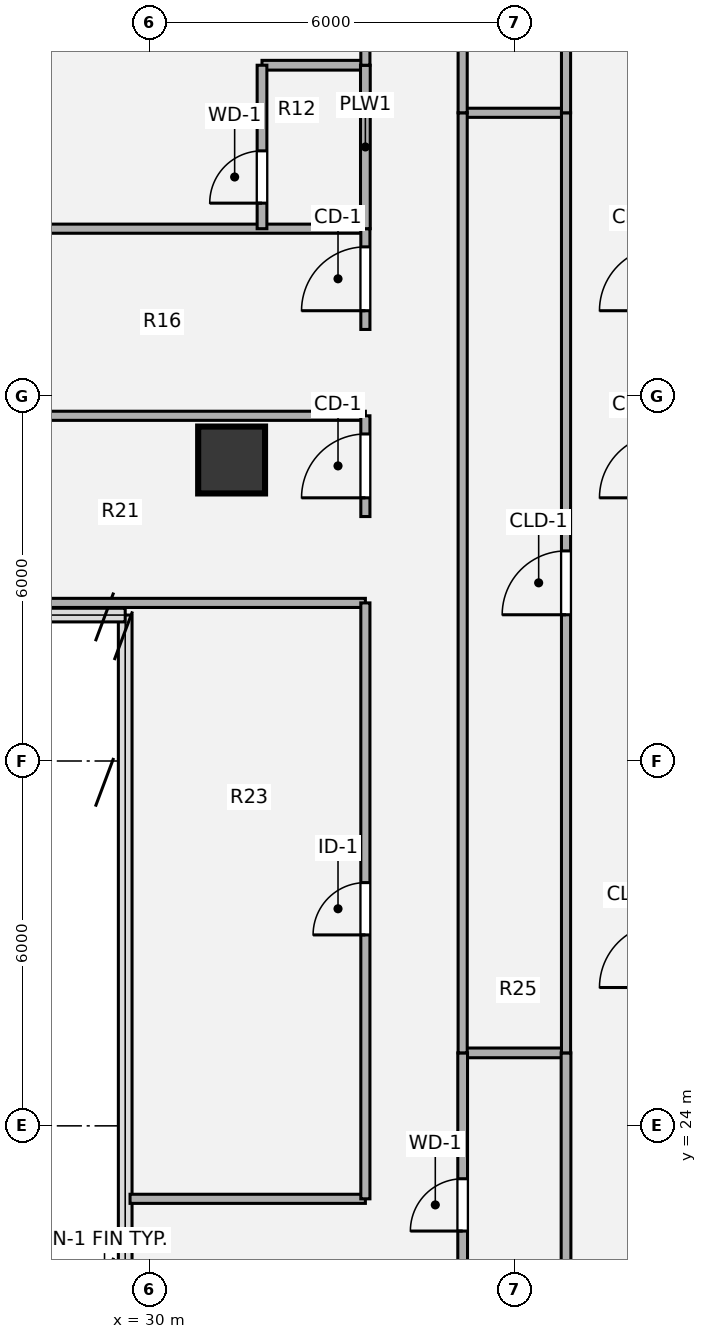
"""IFC4 building model, lengths in metres.
Left out: names, types, materials, properties, quantities, classifications, styles, units other than length and angle.
Written with IfcOpenShell. Run it as: python <this file> out.ifc"""

import sys

from ifc_helpers import new_model, si_unit, direction, frame, frame_2d, origin, origin_2d, place, context, subcontext, project, spatial, rectangle, hollow_circle, extrude, source, transform, mapped, element, fill, save


model = new_model("IFC4")
c1 = context("Model", 3, precision=1e-05, world=origin(), true_north=direction((0.0, 1.0)))
c2 = subcontext(c1, "Body", "Model", "MODEL_VIEW")
j1 = project(units=[si_unit("LENGTHUNIT", "METRE"), si_unit("PLANEANGLEUNIT", "RADIAN")], contexts=[c1])
p1 = place(None, origin())
s1 = spatial("IfcSite", under=j1, at=p1, CompositionType="ELEMENT")
p2 = place(p1, origin())
s2 = spatial("IfcBuilding", under=s1, at=p2, CompositionType="ELEMENT")
p3 = place(p2, frame((0.0, 0.0, 167.76)))
s3 = spatial("IfcBuildingStorey", under=s2, at=p3, CompositionType="ELEMENT", Elevation=167.76)
m1 = source(origin(), c2, "Body", "SweptSolid", [
    extrude(hollow_circle(Radius=0.55, WallThickness=0.04, at=origin_2d()), origin(), (0.0, 0.0, 1.0), 3.78),
])
p4 = place(p3, frame((31.35, 34.95, 0.0), z_axis=(0.0, 0.0, 1.0), x_axis=(1.0, 0.0, 0.0)))
e1 = element("IfcColumn", 1, at=p4, inside=s3, PredefinedType="COLUMN", context=c2, shape_type="MappedRepresentation", body=[
    mapped(m1, transform((0.0, 0.0, 0.0), x_axis=(1.0, 0.0, 0.0), y_axis=(0.0, 1.0, 0.0), z_axis=(0.0, 0.0, 1.0), scale=1.0)),
])
p5 = place(p3, frame((29.68, 22.8, 0.0), z_axis=(0.0, 0.0, 1.0), x_axis=(1.0, 0.0, 0.0)))
e2 = element("IfcWall", 2, at=p5, inside=s3, PredefinedType="PARTITIONING", context=c2, shape_type="SweptSolid", body=[
    extrude(rectangle(XDim=3.87, YDim=0.15, at=frame_2d((1.935, 0.0))), origin(), (0.0, 0.0, 1.0), 3.5),
])
p6 = place(p3, frame((35.15, 25.2, 0.0), z_axis=(0.0, 0.0, 1.0), x_axis=(1.0, 0.0, 0.0)))
e3 = element("IfcWall", 3, at=p6, inside=s3, PredefinedType="PLUMBINGWALL", context=c2, shape_type="SweptSolid", body=[
    extrude(rectangle(XDim=1.7, YDim=0.16, at=frame_2d((0.85, 0.0))), origin(), (0.0, 0.0, 1.0), 3.5),
])
p7 = place(p3, frame((27.557, 32.6, 0.0), z_axis=(0.0, 0.0, 1.0), x_axis=(1.0, 0.0, 0.0)))
e4 = element("IfcWall", 4, at=p7, inside=s3, PredefinedType="PARTITIONING", context=c2, shape_type="SweptSolid", body=[
    extrude(rectangle(XDim=5.993, YDim=0.15, at=frame_2d((2.997, 0.0))), origin(), (0.0, 0.0, 1.0), 3.5),
])
for number, where, z_axis, x_axis in (
    (5, (27.35, 35.677, 0.0), (0.0, 0.0, 1.0), (1.0, 0.0, 0.0)),
    (6, (27.35, 38.754, 0.0), (0.0, 0.0, 1.0), (1.0, 0.0, 0.0)),
):
    element("IfcWall", number, at=place(p3, frame(where, z_axis=z_axis, x_axis=x_axis)), inside=s3, PredefinedType="PARTITIONING", context=c2, shape_type="SweptSolid", body=[
        extrude(rectangle(XDim=6.2, YDim=0.15, at=frame_2d((3.1, 0.0))), origin(), (0.0, 0.0, 1.0), 2.982),
    ])
p8 = place(p3, frame((35.15, 40.66, 0.0), z_axis=(0.0, 0.0, 1.0), x_axis=(1.0, 0.0, 0.0)))
e7 = element("IfcWall", 7, at=p8, inside=s3, PredefinedType="PARTITIONING", context=c2, shape_type="SweptSolid", body=[
    extrude(rectangle(XDim=1.7, YDim=0.15, at=frame_2d((0.85, 0.0))), origin(), (0.0, 0.0, 1.0), 3.259),
])
p9 = place(p3, frame((31.85, 41.442, 0.0), z_axis=(0.0, 0.0, 1.0), x_axis=(1.0, 0.0, 0.0)))
e8 = element("IfcWall", 8, at=p9, inside=s3, PredefinedType="PLUMBINGWALL", context=c2, shape_type="SweptSolid", body=[
    extrude(rectangle(XDim=1.7, YDim=0.16, at=frame_2d((0.85, 0.0))), origin(), (0.0, 0.0, 1.0), 3.259),
])
p10 = place(p3, frame((31.85, 38.754, 0.0), z_axis=(0.0, 0.0, 1.0), x_axis=(0.0, 1.0, 0.0)))
e9 = element("IfcWall", 9, at=p10, inside=s3, PredefinedType="PLUMBINGWALL", context=c2, shape_type="SweptSolid", body=[
    extrude(rectangle(XDim=2.688, YDim=0.16, at=frame_2d((1.344, 0.0))), origin(), (0.0, 0.0, 1.0), 3.5),
])
p11 = place(p10, frame((0.42, 0.0, 0.0)))
e10 = element("IfcOpeningElement", 10, at=p11, cuts=e9, PredefinedType="OPENING", context=c2, shape_type="SweptSolid", body=[
    extrude(rectangle(XDim=0.86, YDim=2.1, at=origin_2d()), frame((0.43, 0.09, 1.05), z_axis=(0.0, -1.0, 0.0), x_axis=(1.0, 0.0, 0.0)), (0.0, 0.0, 1.0), 0.18),
])
p12 = place(p3, frame((33.55, 22.8, 0.0), z_axis=(0.0, 0.0, 1.0), x_axis=(0.0, 1.0, 0.0)))
e11 = element("IfcWall", 11, at=p12, inside=s3, PredefinedType="PARTITIONING", context=c2, shape_type="SweptSolid", body=[
    extrude(rectangle(XDim=9.8, YDim=0.15, at=frame_2d((4.9, 0.0))), origin(), (0.0, 0.0, 1.0), 3.5),
])
p13 = place(p12, frame((4.34, 0.0, 0.0)))
e12 = element("IfcOpeningElement", 12, at=p13, cuts=e11, PredefinedType="OPENING", context=c2, shape_type="SweptSolid", body=[
    extrude(rectangle(XDim=0.86, YDim=2.1, at=origin_2d()), frame((0.43, 0.085, 1.05), z_axis=(0.0, -1.0, 0.0), x_axis=(1.0, 0.0, 0.0)), (0.0, 0.0, 1.0), 0.17),
])
p14 = place(p3, frame((33.55, 34.02, 0.0), z_axis=(0.0, 0.0, 1.0), x_axis=(0.0, 1.0, 0.0)))
e13 = element("IfcWall", 13, at=p14, inside=s3, PredefinedType="PARTITIONING", context=c2, shape_type="SweptSolid", body=[
    extrude(rectangle(XDim=1.657, YDim=0.15, at=frame_2d((0.829, 0.0))), origin(), (0.0, 0.0, 1.0), 3.5),
])
p15 = place(p14, frame((0.308, 0.0, 0.0)))
e14 = element("IfcOpeningElement", 14, at=p15, cuts=e13, PredefinedType="OPENING", context=c2, shape_type="SweptSolid", body=[
    extrude(rectangle(XDim=1.05, YDim=2.1, at=origin_2d()), frame((0.525, 0.085, 1.05), z_axis=(0.0, -1.0, 0.0), x_axis=(1.0, 0.0, 0.0)), (0.0, 0.0, 1.0), 0.17),
])
p16 = place(p3, frame((33.55, 37.097, 0.0), z_axis=(0.0, 0.0, 1.0), x_axis=(0.0, 1.0, 0.0)))
e15 = element("IfcWall", 15, at=p16, inside=s3, PredefinedType="PARTITIONING", context=c2, shape_type="SweptSolid", body=[
    extrude(rectangle(XDim=1.657, YDim=0.15, at=frame_2d((0.829, 0.0))), origin(), (0.0, 0.0, 1.0), 3.5),
])
p17 = place(p16, frame((0.308, 0.0, 0.0)))
e16 = element("IfcOpeningElement", 16, at=p17, cuts=e15, PredefinedType="OPENING", context=c2, shape_type="SweptSolid", body=[
    extrude(rectangle(XDim=1.05, YDim=2.1, at=origin_2d()), frame((0.525, 0.085, 1.05), z_axis=(0.0, -1.0, 0.0), x_axis=(1.0, 0.0, 0.0)), (0.0, 0.0, 1.0), 0.17),
])
p18 = place(p3, frame((33.55, 38.754, 0.0), z_axis=(0.0, 0.0, 1.0), x_axis=(0.0, 1.0, 0.0)))
e17 = element("IfcWall", 17, at=p18, inside=s3, PredefinedType="PLUMBINGWALL", context=c2, shape_type="SweptSolid", body=[
    extrude(rectangle(XDim=2.688, YDim=0.16, at=frame_2d((1.344, 0.0))), origin(), (0.0, 0.0, 1.0), 3.5),
])
p19 = place(p3, frame((33.55, 41.442, 0.0), z_axis=(0.0, 0.0, 1.0), x_axis=(0.0, 1.0, 0.0)))
e18 = element("IfcWall", 18, at=p19, inside=s3, PredefinedType="PARTITIONING", context=c2, shape_type="SweptSolid", body=[
    extrude(rectangle(XDim=3.285, YDim=0.15, at=frame_2d((1.643, 0.0))), origin(), (0.0, 0.0, 1.0), 3.5),
])
p20 = place(p19, frame((1.122, 0.0, 0.0)))
e19 = element("IfcOpeningElement", 19, at=p20, cuts=e18, PredefinedType="OPENING", context=c2, shape_type="SweptSolid", body=[
    extrude(rectangle(XDim=1.05, YDim=2.1, at=origin_2d()), frame((0.525, 0.085, 1.05), z_axis=(0.0, -1.0, 0.0), x_axis=(1.0, 0.0, 0.0)), (0.0, 0.0, 1.0), 0.17),
])
p21 = place(p3, frame((35.15, 20.2, 0.0), z_axis=(0.0, 0.0, 1.0), x_axis=(0.0, 1.0, 0.0)))
e20 = element("IfcWall", 20, at=p21, inside=s3, PredefinedType="PLUMBINGWALL", context=c2, shape_type="SweptSolid", body=[
    extrude(rectangle(XDim=5.0, YDim=0.16, at=frame_2d((2.5, 0.0))), origin(), (0.0, 0.0, 1.0), 3.5),
])
p22 = place(p21, frame((2.07, 0.0, 0.0)))
e21 = element("IfcOpeningElement", 21, at=p22, cuts=e20, PredefinedType="OPENING", context=c2, shape_type="SweptSolid", body=[
    extrude(rectangle(XDim=0.86, YDim=2.1, at=origin_2d()), frame((0.43, 0.09, 1.05), z_axis=(0.0, -1.0, 0.0), x_axis=(1.0, 0.0, 0.0)), (0.0, 0.0, 1.0), 0.18),
])
p23 = place(p3, frame((35.15, 25.2, 0.0), z_axis=(0.0, 0.0, 1.0), x_axis=(0.0, 1.0, 0.0)))
e22 = element("IfcWall", 22, at=p23, inside=s3, PredefinedType="PARTITIONING", context=c2, shape_type="SweptSolid", body=[
    extrude(rectangle(XDim=15.46, YDim=0.15, at=frame_2d((7.73, 0.0))), origin(), (0.0, 0.0, 1.0), 3.5),
])
p24 = place(p3, frame((35.15, 40.66, 0.0), z_axis=(0.0, 0.0, 1.0), x_axis=(0.0, 1.0, 0.0)))
e23 = element("IfcWall", 23, at=p24, inside=s3, PredefinedType="PARTITIONING", context=c2, shape_type="SweptSolid", body=[
    extrude(rectangle(XDim=10.54, YDim=0.15, at=frame_2d((5.27, 0.0))), origin(), (0.0, 0.0, 1.0), 3.5),
])
p25 = place(p24, frame((4.81, 0.0, 0.0)))
e24 = element("IfcOpeningElement", 24, at=p25, cuts=e23, PredefinedType="OPENING", context=c2, shape_type="SweptSolid", body=[
    extrude(rectangle(XDim=0.86, YDim=2.1, at=origin_2d()), frame((0.43, 0.085, 1.05), z_axis=(0.0, -1.0, 0.0), x_axis=(1.0, 0.0, 0.0)), (0.0, 0.0, 1.0), 0.17),
])
p26 = place(p3, frame((36.85, 20.2, 0.0), z_axis=(0.0, 0.0, 1.0), x_axis=(0.0, 1.0, 0.0)))
e25 = element("IfcWall", 25, at=p26, inside=s3, PredefinedType="PLUMBINGWALL", context=c2, shape_type="SweptSolid", body=[
    extrude(rectangle(XDim=5.0, YDim=0.16, at=frame_2d((2.5, 0.0))), origin(), (0.0, 0.0, 1.0), 3.5),
])
p27 = place(p3, frame((36.85, 25.2, 0.0), z_axis=(0.0, 0.0, 1.0), x_axis=(0.0, 1.0, 0.0)))
e26 = element("IfcWall", 26, at=p27, inside=s3, PredefinedType="PARTITIONING", context=c2, shape_type="SweptSolid", body=[
    extrude(rectangle(XDim=15.46, YDim=0.15, at=frame_2d((7.73, 0.0))), origin(), (0.0, 0.0, 1.0), 3.5),
])
p28 = place(p27, frame((7.205, 0.0, 0.0)))
e27 = element("IfcOpeningElement", 27, at=p28, cuts=e26, PredefinedType="OPENING", context=c2, shape_type="SweptSolid", body=[
    extrude(rectangle(XDim=1.05, YDim=2.1, at=origin_2d()), frame((0.525, 0.085, 1.05), z_axis=(0.0, -1.0, 0.0), x_axis=(1.0, 0.0, 0.0)), (0.0, 0.0, 1.0), 0.17),
])
p29 = place(p3, frame((36.85, 40.66, 0.0), z_axis=(0.0, 0.0, 1.0), x_axis=(0.0, 1.0, 0.0)))
e28 = element("IfcWall", 28, at=p29, inside=s3, PredefinedType="PARTITIONING", context=c2, shape_type="SweptSolid", body=[
    extrude(rectangle(XDim=10.54, YDim=0.15, at=frame_2d((5.27, 0.0))), origin(), (0.0, 0.0, 1.0), 3.5),
])
m2 = source(origin(), c2, "Body", "SweptSolid", [
    extrude(rectangle(XDim=0.86, YDim=2.1, at=origin_2d()), frame((0.43, 0.025, 1.05), z_axis=(0.0, -1.0, 0.0), x_axis=(1.0, 0.0, 0.0)), (0.0, 0.0, 1.0), 0.05),
])
p30 = place(p11, origin())
e29 = element("IfcDoor", 29, at=p30, inside=s3, OperationType="SINGLE_SWING_LEFT", PredefinedType="DOOR", context=c2, shape_type="MappedRepresentation", body=[
    mapped(m2, transform((0.0, 0.0, 0.0), x_axis=(1.0, 0.0, 0.0), y_axis=(0.0, 1.0, 0.0), z_axis=(0.0, 0.0, 1.0), scale=1.0)),
])
fill(e10, e29)
m3 = source(origin(), c2, "Body", "SweptSolid", [
    extrude(rectangle(XDim=0.86, YDim=2.1, at=origin_2d()), frame((0.43, 0.025, 1.05), z_axis=(0.0, -1.0, 0.0), x_axis=(1.0, 0.0, 0.0)), (0.0, 0.0, 1.0), 0.05),
])
p31 = place(p13, origin())
e30 = element("IfcDoor", 30, at=p31, inside=s3, OperationType="SINGLE_SWING_LEFT", PredefinedType="DOOR", context=c2, shape_type="MappedRepresentation", body=[
    mapped(m3, transform((0.0, 0.0, 0.0), x_axis=(1.0, 0.0, 0.0), y_axis=(0.0, 1.0, 0.0), z_axis=(0.0, 0.0, 1.0), scale=1.0)),
])
fill(e12, e30)
m4 = source(origin(), c2, "Body", "SweptSolid", [
    extrude(rectangle(XDim=1.05, YDim=2.1, at=origin_2d()), frame((0.525, 0.025, 1.05), z_axis=(0.0, -1.0, 0.0), x_axis=(1.0, 0.0, 0.0)), (0.0, 0.0, 1.0), 0.05),
])
p32 = place(p15, origin())
e31 = element("IfcDoor", 31, at=p32, inside=s3, OperationType="SINGLE_SWING_LEFT", PredefinedType="DOOR", context=c2, shape_type="MappedRepresentation", body=[
    mapped(m4, transform((0.0, 0.0, 0.0), x_axis=(1.0, 0.0, 0.0), y_axis=(0.0, 1.0, 0.0), z_axis=(0.0, 0.0, 1.0), scale=1.0)),
])
fill(e14, e31)
p33 = place(p17, origin())
e32 = element("IfcDoor", 32, at=p33, inside=s3, OperationType="SINGLE_SWING_LEFT", PredefinedType="DOOR", context=c2, shape_type="MappedRepresentation", body=[
    mapped(m4, transform((0.0, 0.0, 0.0), x_axis=(1.0, 0.0, 0.0), y_axis=(0.0, 1.0, 0.0), z_axis=(0.0, 0.0, 1.0), scale=1.0)),
])
fill(e16, e32)
p34 = place(p22, origin())
e33 = element("IfcDoor", 33, at=p34, inside=s3, OperationType="SINGLE_SWING_LEFT", PredefinedType="DOOR", context=c2, shape_type="MappedRepresentation", body=[
    mapped(m2, transform((0.0, 0.0, 0.0), x_axis=(1.0, 0.0, 0.0), y_axis=(0.0, 1.0, 0.0), z_axis=(0.0, 0.0, 1.0), scale=1.0)),
])
fill(e21, e33)
m5 = source(origin(), c2, "Body", "SweptSolid", [
    extrude(rectangle(XDim=1.05, YDim=2.1, at=origin_2d()), frame((0.525, 0.025, 1.05), z_axis=(0.0, -1.0, 0.0), x_axis=(1.0, 0.0, 0.0)), (0.0, 0.0, 1.0), 0.05),
])
p35 = place(p28, origin())
e34 = element("IfcDoor", 34, at=p35, inside=s3, OperationType="SINGLE_SWING_LEFT", PredefinedType="DOOR", context=c2, shape_type="MappedRepresentation", body=[
    mapped(m5, transform((0.0, 0.0, 0.0), x_axis=(1.0, 0.0, 0.0), y_axis=(0.0, 1.0, 0.0), z_axis=(0.0, 0.0, 1.0), scale=1.0)),
])
fill(e27, e34)
save(model, sys.argv[1])
